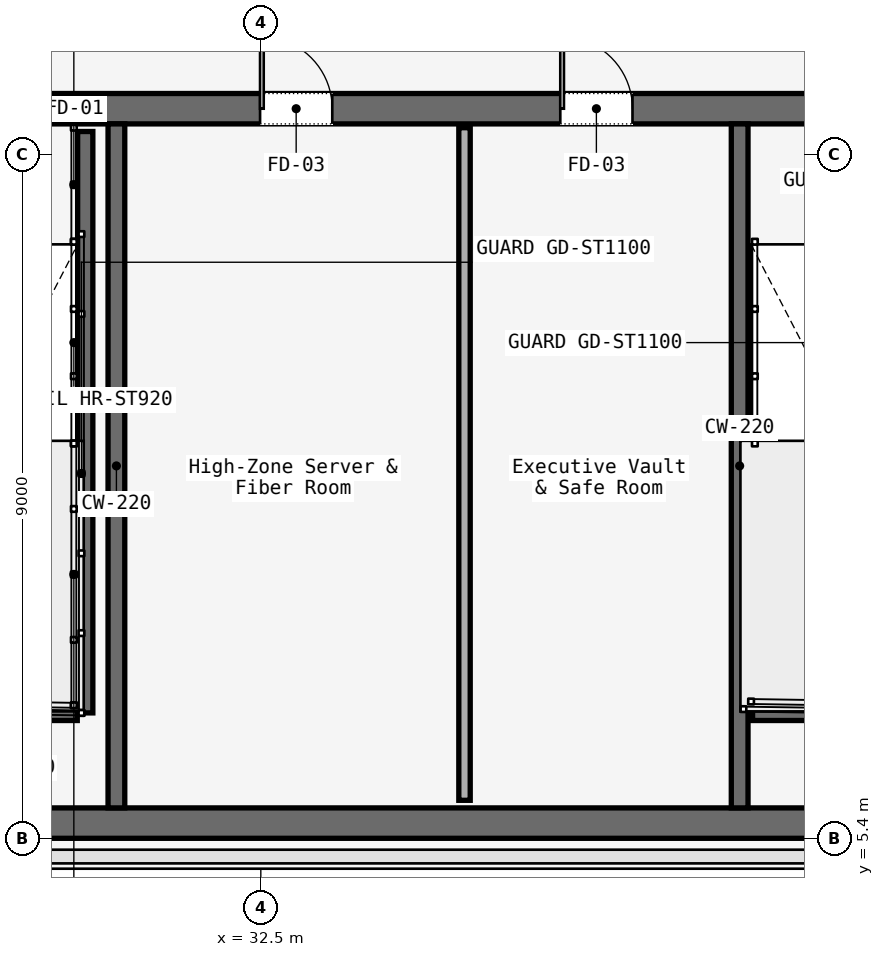
"""IFC4 building model, lengths in metres.
Left out: names, types, materials, properties, quantities, classifications, styles, units other than length and angle.
Written with IfcOpenShell. Run it as: python <this file> out.ifc"""

import sys

from ifc_helpers import new_model, si_unit, direction, frame, frame_2d, origin, place, context, subcontext, project, spatial, rectangle, extrude, element, fill, save


model = new_model("IFC4")
c1 = context("Model", 3, precision=1e-05, world=origin(), true_north=direction((0.0, 1.0)))
c2 = subcontext(c1, "Body", "Model", "MODEL_VIEW")
j1 = project(units=[si_unit("LENGTHUNIT", "METRE"), si_unit("PLANEANGLEUNIT", "RADIAN")], contexts=[c1])
p1 = place(None, origin())
s1 = spatial("IfcSite", under=j1, at=p1, CompositionType="ELEMENT")
p2 = place(p1, origin())
s2 = spatial("IfcBuilding", under=s1, at=p2, CompositionType="ELEMENT")
p3 = place(p2, frame((0.0, 0.0, 240.8)))
s3 = spatial("IfcBuildingStorey", under=s2, at=p3, CompositionType="ELEMENT", Elevation=240.8)
p4 = place(p3, frame((26.45, 15.0, 0.0), z_axis=(0.0, 0.0, 1.0), x_axis=(1.0, 0.0, 0.0)))
e1 = element("IfcWall", 1, at=p4, inside=s3, PredefinedType="SOLIDWALL", context=c2, shape_type="SweptSolid", body=[
    extrude(rectangle(XDim=31.1, YDim=0.4, at=frame_2d((15.55, 0.0))), origin(), (0.0, 0.0, 1.0), 3.58),
])
p5 = place(p4, frame((1.65, 0.0, 0.0)))
e2 = element("IfcOpeningElement", 2, at=p5, cuts=e1, PredefinedType="OPENING", context=c2, shape_type="SweptSolid", body=[
    extrude(rectangle(XDim=1.1, YDim=2.2, at=frame_2d((0.55, 1.1))), frame((0.0, 0.2, 0.0), z_axis=(0.0, -1.0, 0.0), x_axis=(1.0, 0.0, 0.0)), (0.0, 0.0, 1.0), 0.4),
])
p6 = place(p4, frame((13.65, 0.0, 0.0)))
e3 = element("IfcOpeningElement", 3, at=p6, cuts=e1, PredefinedType="OPENING", context=c2, shape_type="SweptSolid", body=[
    extrude(rectangle(XDim=1.1, YDim=2.2, at=frame_2d((0.55, 1.1))), frame((0.0, 0.2, 0.0), z_axis=(0.0, -1.0, 0.0), x_axis=(1.0, 0.0, 0.0)), (0.0, 0.0, 1.0), 0.4),
])
p7 = place(p4, frame((25.55, 0.0, 0.0)))
e4 = element("IfcOpeningElement", 4, at=p7, cuts=e1, PredefinedType="OPENING", context=c2, shape_type="SweptSolid", body=[
    extrude(rectangle(XDim=1.1, YDim=2.2, at=frame_2d((0.55, 1.1))), frame((0.0, 0.2, 0.0), z_axis=(0.0, -1.0, 0.0), x_axis=(1.0, 0.0, 0.0)), (0.0, 0.0, 1.0), 0.4),
])
p8 = place(p4, frame((19.35, 0.0, 0.0)))
e5 = element("IfcOpeningElement", 5, at=p8, cuts=e1, PredefinedType="OPENING", context=c2, shape_type="SweptSolid", body=[
    extrude(rectangle(XDim=1.1, YDim=2.2, at=frame_2d((0.55, 1.1))), frame((0.0, 0.2, 0.0), z_axis=(0.0, -1.0, 0.0), x_axis=(1.0, 0.0, 0.0)), (0.0, 0.0, 1.0), 0.4),
])
p9 = place(p4, frame((21.4, 0.0, 0.0)))
e6 = element("IfcOpeningElement", 6, at=p9, cuts=e1, PredefinedType="OPENING", context=c2, shape_type="SweptSolid", body=[
    extrude(rectangle(XDim=0.9, YDim=2.1, at=frame_2d((0.45, 1.05))), frame((0.0, 0.2, 0.0), z_axis=(0.0, -1.0, 0.0), x_axis=(1.0, 0.0, 0.0)), (0.0, 0.0, 1.0), 0.4),
])
p10 = place(p4, frame((6.04, 0.0, 0.0)))
e7 = element("IfcOpeningElement", 7, at=p10, cuts=e1, PredefinedType="OPENING", context=c2, shape_type="SweptSolid", body=[
    extrude(rectangle(XDim=0.95, YDim=2.2, at=frame_2d((0.475, 1.1))), frame((0.0, 0.2, 0.0), z_axis=(0.0, -1.0, 0.0), x_axis=(1.0, 0.0, 0.0)), (0.0, 0.0, 1.0), 0.4),
])
p11 = place(p4, frame((9.99, 0.0, 0.0)))
e8 = element("IfcOpeningElement", 8, at=p11, cuts=e1, PredefinedType="OPENING", context=c2, shape_type="SweptSolid", body=[
    extrude(rectangle(XDim=0.95, YDim=2.2, at=frame_2d((0.475, 1.1))), frame((0.0, 0.2, 0.0), z_axis=(0.0, -1.0, 0.0), x_axis=(1.0, 0.0, 0.0)), (0.0, 0.0, 1.0), 0.4),
])
p12 = place(p4, frame((23.35, 0.0, 0.0)))
e9 = element("IfcOpeningElement", 9, at=p12, cuts=e1, PredefinedType="OPENING", context=c2, shape_type="SweptSolid", body=[
    extrude(rectangle(XDim=1.3, YDim=2.3, at=frame_2d((0.65, 1.15))), frame((0.0, 0.2, 0.0), z_axis=(0.0, -1.0, 0.0), x_axis=(1.0, 0.0, 0.0)), (0.0, 0.0, 1.0), 0.4),
])
p13 = place(p3, frame((26.45, 5.6, 0.0), z_axis=(0.0, 0.0, 1.0), x_axis=(1.0, 0.0, 0.0)))
e10 = element("IfcWall", 10, at=p13, inside=s3, PredefinedType="SOLIDWALL", context=c2, shape_type="SweptSolid", body=[
    extrude(rectangle(XDim=31.1, YDim=0.4, at=frame_2d((15.55, 0.0))), origin(), (0.0, 0.0, 1.0), 3.58),
])
for number, where, z_axis, x_axis in (
    (11, (30.6, 5.8, 0.0), (0.0, 0.0, 1.0), (0.0, 1.0, 0.0)),
    (12, (38.8, 5.8, 0.0), (0.0, 0.0, 1.0), (0.0, 1.0, 0.0)),
):
    element("IfcWall", number, at=place(p3, frame(where, z_axis=z_axis, x_axis=x_axis)), inside=s3, PredefinedType="SOLIDWALL", context=c2, shape_type="SweptSolid", body=[
        extrude(rectangle(XDim=9.0, YDim=0.22, at=frame_2d((4.5, 0.0))), origin(), (0.0, 0.0, 1.0), 3.58),
    ])
p14 = place(p3, frame((30.19, 14.7, 0.0), z_axis=(0.0, 0.0, 1.0), x_axis=(0.0, -1.0, 0.0)))
e13 = element("IfcWall", 13, at=p14, inside=s3, PredefinedType="SOLIDWALL", context=c2, shape_type="SweptSolid", body=[
    extrude(rectangle(XDim=7.65, YDim=0.2, at=frame_2d((3.825, 0.0))), origin(), (0.0, 0.0, 1.0), 3.8),
])
for number, where, z_axis, x_axis in (
    (14, (26.97, 7.05, 0.0), (0.0, 0.0, 1.0), (1.0, 0.0, 0.0)),
    (15, (38.97, 7.05, 0.0), (0.0, 0.0, 1.0), (1.0, 0.0, 0.0)),
):
    element("IfcWall", number, at=place(p3, frame(where, z_axis=z_axis, x_axis=x_axis)), inside=s3, PredefinedType="SOLIDWALL", context=c2, shape_type="SweptSolid", body=[
        extrude(rectangle(XDim=3.115, YDim=0.2, at=frame_2d((1.558, 0.0))), origin(), (0.0, 0.0, 1.0), 3.8),
    ])
p15 = place(p3, frame((35.18, 5.9, 0.0), z_axis=(0.0, 0.0, 1.0), x_axis=(0.0, 1.0, 0.0)))
e16 = element("IfcWall", 16, at=p15, inside=s3, PredefinedType="PARTITIONING", context=c2, shape_type="SweptSolid", body=[
    extrude(rectangle(XDim=8.85, YDim=0.15, at=frame_2d((4.425, 0.0))), origin(), (0.0, 0.0, 1.0), 3.01),
])
p16 = place(p10, origin())
e17 = element("IfcDoor", 17, at=p16, inside=s3, OperationType="SINGLE_SWING_LEFT", PredefinedType="DOOR", context=c2, shape_type="SweptSolid", body=[
    extrude(rectangle(XDim=0.95, YDim=2.2, at=frame_2d((0.475, 1.1))), frame((0.0, 0.025, 0.0), z_axis=(0.0, -1.0, 0.0), x_axis=(1.0, 0.0, 0.0)), (0.0, 0.0, 1.0), 0.05),
])
fill(e7, e17)
p17 = place(p11, origin())
e18 = element("IfcDoor", 18, at=p17, inside=s3, OperationType="SINGLE_SWING_RIGHT", PredefinedType="DOOR", context=c2, shape_type="SweptSolid", body=[
    extrude(rectangle(XDim=0.95, YDim=2.2, at=frame_2d((0.475, 1.1))), frame((0.0, 0.025, 0.0), z_axis=(0.0, -1.0, 0.0), x_axis=(1.0, 0.0, 0.0)), (0.0, 0.0, 1.0), 0.05),
])
fill(e8, e18)
save(model, sys.argv[1])
